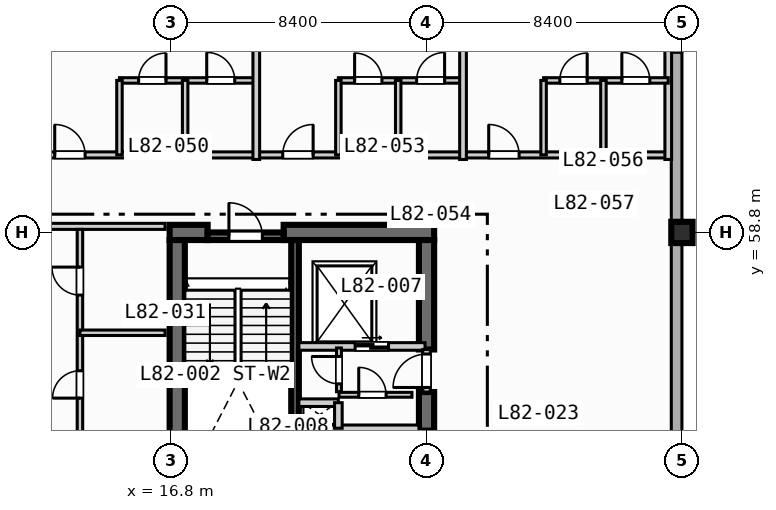
"""IFC4 building model, lengths in metres.
Left out: names, types, materials, properties, quantities, classifications, styles, units other than length and angle.
Written with IfcOpenShell. Run it as: python <this file> out.ifc"""

import sys

from ifc_helpers import new_model, si_unit, direction, frame, frame_2d, origin, origin_2d, place, context, subcontext, project, spatial, rectangle, extrude, element, fill, save


model = new_model("IFC4")
c1 = context("Model", 3, precision=1e-05, world=origin(), true_north=direction((0.0, 1.0)))
c2 = subcontext(c1, "Body", "Model", "MODEL_VIEW")
j1 = project(units=[si_unit("LENGTHUNIT", "METRE"), si_unit("PLANEANGLEUNIT", "RADIAN")], contexts=[c1])
p1 = place(None, origin())
s1 = spatial("IfcSite", under=j1, at=p1, CompositionType="ELEMENT")
p2 = place(p1, origin())
s2 = spatial("IfcBuilding", under=s1, at=p2, CompositionType="ELEMENT")
p3 = place(p2, frame((0.0, 0.0, 332.0)))
s3 = spatial("IfcBuildingStorey", under=s2, at=p3, CompositionType="ELEMENT", Elevation=332.0)
p4 = place(p3, frame((20.875, 50.5, 0.0), z_axis=(0.0, 0.0, 1.0), x_axis=(0.0, 1.0, 0.0)))
e1 = element("IfcWall", 1, at=p4, inside=s3, PredefinedType="SOLIDWALL", context=c2, shape_type="SweptSolid", body=[
    extrude(rectangle(XDim=8.05, YDim=0.25, at=frame_2d((4.025, 0.0))), origin(), (0.0, 0.0, 1.0), 3.67),
])
p5 = place(p3, frame((16.75, 58.8, 0.0), z_axis=(0.0, 0.0, 1.0), x_axis=(1.0, 0.0, 0.0)))
e2 = element("IfcWall", 2, at=p5, inside=s3, PredefinedType="SHEAR", context=c2, shape_type="SweptSolid", body=[
    extrude(rectangle(XDim=1.25, YDim=0.5, at=frame_2d((0.625, 0.0))), origin(), (0.0, 0.0, 1.0), 3.67),
])
p6 = place(p3, frame((20.5, 58.8, 0.0), z_axis=(0.0, 0.0, 1.0), x_axis=(1.0, 0.0, 0.0)))
e3 = element("IfcWall", 3, at=p6, inside=s3, PredefinedType="SHEAR", context=c2, shape_type="SweptSolid", body=[
    extrude(rectangle(XDim=4.95, YDim=0.5, at=frame_2d((2.475, 0.0))), origin(), (0.0, 0.0, 1.0), 3.67),
])
p7 = place(p3, frame((17.0, 42.2, 0.0), z_axis=(0.0, 0.0, 1.0), x_axis=(0.0, 1.0, 0.0)))
e4 = element("IfcWall", 4, at=p7, inside=s3, PredefinedType="SHEAR", context=c2, shape_type="SweptSolid", body=[
    extrude(rectangle(XDim=16.35, YDim=0.5, at=frame_2d((8.175, 0.0))), origin(), (0.0, 0.0, 1.0), 3.67),
])
p8 = place(p3, frame((25.2, 52.28, 0.0), z_axis=(0.0, 0.0, 1.0), x_axis=(0.0, 1.0, 0.0)))
e5 = element("IfcWall", 5, at=p8, inside=s3, PredefinedType="SHEAR", context=c2, shape_type="SweptSolid", body=[
    extrude(rectangle(XDim=1.27, YDim=0.5, at=frame_2d((0.635, 0.0))), origin(), (0.0, 0.0, 1.0), 3.67),
])
p9 = place(p3, frame((25.2, 54.95, 0.0), z_axis=(0.0, 0.0, 1.0), x_axis=(0.0, 1.0, 0.0)))
e6 = element("IfcWall", 6, at=p9, inside=s3, PredefinedType="SHEAR", context=c2, shape_type="SweptSolid", body=[
    extrude(rectangle(XDim=3.6, YDim=0.5, at=frame_2d((1.8, 0.0))), origin(), (0.0, 0.0, 1.0), 3.67),
])
p10 = place(p3, frame((33.6, 58.8, 0.0), z_axis=(0.0, 0.0, 1.0), x_axis=(1.0, 0.0, 0.0)))
e7 = element("IfcColumn", 7, at=p10, inside=s3, PredefinedType="COLUMN", context=c2, shape_type="SweptSolid", body=[
    extrude(rectangle(XDim=0.7, YDim=0.7, at=origin_2d()), origin(), (0.0, 0.0, 1.0), 3.9),
])
p11 = place(p3, frame((33.425, 72.425, 0.0), z_axis=(0.0, 0.0, 1.0), x_axis=(0.0, -1.0, 0.0)))
e8 = element("IfcWall", 8, at=p11, inside=s3, PredefinedType="STANDARD", context=c2, shape_type="SweptSolid", body=[
    extrude(rectangle(XDim=39.0, YDim=0.35, at=frame_2d((19.5, 0.0))), origin(), (0.0, 0.0, 1.0), 3.67),
])
p12 = place(p11, frame((5.9, 0.0, 0.85)))
e9 = element("IfcOpeningElement", 9, at=p12, cuts=e8, PredefinedType="OPENING", context=c2, shape_type="SweptSolid", body=[
    extrude(rectangle(XDim=1.8, YDim=1.8, at=frame_2d((0.9, 0.9))), frame((0.0, 0.185, 0.0), z_axis=(0.0, -1.0, 0.0), x_axis=(1.0, 0.0, 0.0)), (0.0, 0.0, 1.0), 0.37),
])
p13 = place(p3, frame((18.0, 58.675, 0.0), z_axis=(0.0, 0.0, 1.0), x_axis=(1.0, 0.0, 0.0)))
e10 = element("IfcWall", 10, at=p13, inside=s3, PredefinedType="SOLIDWALL", context=c2, shape_type="SweptSolid", body=[
    extrude(rectangle(XDim=2.5, YDim=0.25, at=frame_2d((1.25, 0.0))), origin(), (0.0, 0.0, 1.0), 3.67),
])
p14 = place(p13, frame((0.7, 0.0, 0.0)))
e11 = element("IfcOpeningElement", 11, at=p14, cuts=e10, PredefinedType="OPENING", context=c2, shape_type="SweptSolid", body=[
    extrude(rectangle(XDim=1.1, YDim=2.15, at=frame_2d((0.55, 1.075))), frame((0.0, 0.135, 0.0), z_axis=(0.0, -1.0, 0.0), x_axis=(1.0, 0.0, 0.0)), (0.0, 0.0, 1.0), 0.27),
])
p15 = place(p3, frame((21.0, 52.34, 0.0), z_axis=(0.0, 0.0, 1.0), x_axis=(1.0, 0.0, 0.0)))
e12 = element("IfcWall", 12, at=p15, inside=s3, PredefinedType="SOLIDWALL", context=c2, shape_type="SweptSolid", body=[
    extrude(rectangle(XDim=3.95, YDim=0.25, at=frame_2d((1.975, 0.0))), origin(), (0.0, 0.0, 1.0), 3.67),
])
p16 = place(p3, frame((21.0, 55.05, 0.0), z_axis=(0.0, 0.0, 1.0), x_axis=(1.0, 0.0, 0.0)))
e13 = element("IfcWall", 13, at=p16, inside=s3, PredefinedType="SOLIDWALL", context=c2, shape_type="SweptSolid", body=[
    extrude(rectangle(XDim=4.15, YDim=0.25, at=frame_2d((2.075, 0.0))), origin(), (0.0, 0.0, 1.0), 3.67),
])
p17 = place(p16, frame((1.85, 0.0, 0.0)))
e14 = element("IfcOpeningElement", 14, at=p17, cuts=e13, PredefinedType="OPENING", context=c2, shape_type="SweptSolid", body=[
    extrude(rectangle(XDim=1.1, YDim=2.15, at=frame_2d((0.55, 1.075))), frame((0.0, 0.135, 0.0), z_axis=(0.0, -1.0, 0.0), x_axis=(1.0, 0.0, 0.0)), (0.0, 0.0, 1.0), 0.27),
])
p18 = place(p3, frame((25.2, 53.55, 0.0), z_axis=(0.0, 0.0, 1.0), x_axis=(0.0, 1.0, 0.0)))
e15 = element("IfcWall", 15, at=p18, inside=s3, PredefinedType="SOLIDWALL", context=c2, shape_type="SweptSolid", body=[
    extrude(rectangle(XDim=1.4, YDim=0.25, at=frame_2d((0.7, 0.0))), origin(), (0.0, 0.0, 1.0), 3.67),
])
p19 = place(p18, frame((0.15, 0.0, 0.0)))
e16 = element("IfcOpeningElement", 16, at=p19, cuts=e15, PredefinedType="OPENING", context=c2, shape_type="SweptSolid", body=[
    extrude(rectangle(XDim=1.1, YDim=2.15, at=frame_2d((0.55, 1.075))), frame((0.0, 0.135, 0.0), z_axis=(0.0, -1.0, 0.0), x_axis=(1.0, 0.0, 0.0)), (0.0, 0.0, 1.0), 0.27),
])
p20 = place(p3, frame((21.0, 53.2, 0.0), z_axis=(0.0, 0.0, 1.0), x_axis=(1.0, 0.0, 0.0)))
e17 = element("IfcWall", 17, at=p20, inside=s3, PredefinedType="SOLIDWALL", context=c2, shape_type="SweptSolid", body=[
    extrude(rectangle(XDim=1.3, YDim=0.25, at=frame_2d((0.65, 0.0))), origin(), (0.0, 0.0, 1.0), 3.67),
])
p21 = place(p3, frame((22.3, 52.36, 0.0), z_axis=(0.0, 0.0, 1.0), x_axis=(0.0, 1.0, 0.0)))
e18 = element("IfcWall", 18, at=p21, inside=s3, PredefinedType="SOLIDWALL", context=c2, shape_type="SweptSolid", body=[
    extrude(rectangle(XDim=0.84, YDim=0.25, at=frame_2d((0.42, 0.0))), origin(), (0.0, 0.0, 1.0), 3.67),
])
p22 = place(p3, frame((22.32, 53.56, 0.0), z_axis=(0.0, 0.0, 1.0), x_axis=(0.0, 1.0, 0.0)))
e19 = element("IfcWall", 19, at=p22, inside=s3, PredefinedType="PARTITIONING", context=c2, shape_type="SweptSolid", body=[
    extrude(rectangle(XDim=1.44, YDim=0.16, at=frame_2d((0.72, 0.0))), origin(), (0.0, 0.0, 1.0), 3.67),
])
p23 = place(p22, frame((0.26, 0.0, 0.0)))
e20 = element("IfcOpeningElement", 20, at=p23, cuts=e19, PredefinedType="OPENING", context=c2, shape_type="SweptSolid", body=[
    extrude(rectangle(XDim=0.9, YDim=2.1, at=frame_2d((0.45, 1.05))), frame((0.0, 0.09, 0.0), z_axis=(0.0, -1.0, 0.0), x_axis=(1.0, 0.0, 0.0)), (0.0, 0.0, 1.0), 0.18),
])
p24 = place(p3, frame((22.32, 53.46, 0.0), z_axis=(0.0, 0.0, 1.0), x_axis=(1.0, 0.0, 0.0)))
e21 = element("IfcWall", 21, at=p24, inside=s3, PredefinedType="PARTITIONING", context=c2, shape_type="SweptSolid", body=[
    extrude(rectangle(XDim=2.4, YDim=0.16, at=frame_2d((1.2, 0.0))), origin(), (0.0, 0.0, 1.0), 3.67),
])
p25 = place(p24, frame((0.65, 0.0, 0.0)))
e22 = element("IfcOpeningElement", 22, at=p25, cuts=e21, PredefinedType="OPENING", context=c2, shape_type="SweptSolid", body=[
    extrude(rectangle(XDim=0.9, YDim=2.1, at=frame_2d((0.45, 1.05))), frame((0.0, 0.09, 0.0), z_axis=(0.0, -1.0, 0.0), x_axis=(1.0, 0.0, 0.0)), (0.0, 0.0, 1.0), 0.18),
])
p26 = place(p3, frame((8.65, 59.0, 0.0), z_axis=(0.0, 0.0, 1.0), x_axis=(1.0, 0.0, 0.0)))
e23 = element("IfcWall", 23, at=p26, inside=s3, PredefinedType="PARTITIONING", context=c2, shape_type="SweptSolid", body=[
    extrude(rectangle(XDim=7.95, YDim=0.2, at=frame_2d((3.975, 0.0))), origin(), (0.0, 0.0, 1.0), 3.07),
])
p27 = place(p26, frame((2.0, 0.0, 0.0)))
e24 = element("IfcOpeningElement", 24, at=p27, cuts=e23, PredefinedType="OPENING", context=c2, shape_type="SweptSolid", body=[
    extrude(rectangle(XDim=1.0, YDim=2.15, at=frame_2d((0.5, 1.075))), frame((0.0, 0.11, 0.0), z_axis=(0.0, -1.0, 0.0), x_axis=(1.0, 0.0, 0.0)), (0.0, 0.0, 1.0), 0.22),
])
p28 = place(p3, frame((13.8, 52.1, 0.0), z_axis=(0.0, 0.0, 1.0), x_axis=(0.0, 1.0, 0.0)))
e25 = element("IfcWall", 25, at=p28, inside=s3, PredefinedType="PLUMBINGWALL", context=c2, shape_type="SweptSolid", body=[
    extrude(rectangle(XDim=6.8, YDim=0.18, at=frame_2d((3.4, 0.0))), origin(), (0.0, 0.0, 1.0), 3.67),
])
p29 = place(p28, frame((1.25, 0.0, 0.0)))
e26 = element("IfcOpeningElement", 26, at=p29, cuts=e25, PredefinedType="OPENING", context=c2, shape_type="SweptSolid", body=[
    extrude(rectangle(XDim=0.9, YDim=2.1, at=frame_2d((0.45, 1.05))), frame((0.0, 0.1, 0.0), z_axis=(0.0, -1.0, 0.0), x_axis=(1.0, 0.0, 0.0)), (0.0, 0.0, 1.0), 0.2),
])
p30 = place(p28, frame((4.64, 0.0, 0.0)))
e27 = element("IfcOpeningElement", 27, at=p30, cuts=e25, PredefinedType="OPENING", context=c2, shape_type="SweptSolid", body=[
    extrude(rectangle(XDim=0.92, YDim=2.1, at=frame_2d((0.46, 1.05))), frame((0.0, 0.1, 0.0), z_axis=(0.0, -1.0, 0.0), x_axis=(1.0, 0.0, 0.0)), (0.0, 0.0, 1.0), 0.2),
])
p31 = place(p3, frame((13.8, 55.5, 0.0), z_axis=(0.0, 0.0, 1.0), x_axis=(1.0, 0.0, 0.0)))
e28 = element("IfcWall", 28, at=p31, inside=s3, PredefinedType="PLUMBINGWALL", context=c2, shape_type="SweptSolid", body=[
    extrude(rectangle(XDim=2.8, YDim=0.18, at=frame_2d((1.4, 0.0))), origin(), (0.0, 0.0, 1.0), 3.67),
])
p32 = place(p3, frame((11.8, 61.35, 0.0), z_axis=(0.0, 0.0, 1.0), x_axis=(1.0, 0.0, 0.0)))
e29 = element("IfcWall", 29, at=p32, inside=s3, PredefinedType="PARTITIONING", context=c2, shape_type="SweptSolid", body=[
    extrude(rectangle(XDim=21.35, YDim=0.2, at=frame_2d((10.675, 0.0))), origin(), (0.0, 0.0, 1.0), 3.67),
])
p33 = place(p32, frame((1.17, 0.0, 0.0)))
e30 = element("IfcOpeningElement", 30, at=p33, cuts=e29, PredefinedType="OPENING", context=c2, shape_type="SweptSolid", body=[
    extrude(rectangle(XDim=1.0, YDim=2.15, at=frame_2d((0.5, 1.075))), frame((0.0, 0.11, 0.0), z_axis=(0.0, -1.0, 0.0), x_axis=(1.0, 0.0, 0.0)), (0.0, 0.0, 1.0), 0.22),
])
p34 = place(p32, frame((8.67, 0.0, 0.0)))
e31 = element("IfcOpeningElement", 31, at=p34, cuts=e29, PredefinedType="OPENING", context=c2, shape_type="SweptSolid", body=[
    extrude(rectangle(XDim=1.0, YDim=2.15, at=frame_2d((0.5, 1.075))), frame((0.0, 0.11, 0.0), z_axis=(0.0, -1.0, 0.0), x_axis=(1.0, 0.0, 0.0)), (0.0, 0.0, 1.0), 0.22),
])
p35 = place(p32, frame((15.445, 0.0, 0.0)))
e32 = element("IfcOpeningElement", 32, at=p35, cuts=e29, PredefinedType="OPENING", context=c2, shape_type="SweptSolid", body=[
    extrude(rectangle(XDim=1.0, YDim=2.15, at=frame_2d((0.5, 1.075))), frame((0.0, 0.11, 0.0), z_axis=(0.0, -1.0, 0.0), x_axis=(1.0, 0.0, 0.0)), (0.0, 0.0, 1.0), 0.22),
])
p36 = place(p3, frame((15.1, 63.8, 0.0), z_axis=(0.0, 0.0, 1.0), x_axis=(1.0, 0.0, 0.0)))
e33 = element("IfcWall", 33, at=p36, inside=s3, PredefinedType="PLUMBINGWALL", context=c2, shape_type="SweptSolid", body=[
    extrude(rectangle(XDim=4.5, YDim=0.18, at=frame_2d((2.25, 0.0))), origin(), (0.0, 0.0, 1.0), 3.67),
])
p37 = place(p36, frame((0.63, 0.0, 0.0)))
e34 = element("IfcOpeningElement", 34, at=p37, cuts=e33, PredefinedType="OPENING", context=c2, shape_type="SweptSolid", body=[
    extrude(rectangle(XDim=0.9, YDim=2.1, at=frame_2d((0.45, 1.05))), frame((0.0, 0.1, 0.0), z_axis=(0.0, -1.0, 0.0), x_axis=(1.0, 0.0, 0.0)), (0.0, 0.0, 1.0), 0.2),
])
p38 = place(p36, frame((2.87, 0.0, 0.0)))
e35 = element("IfcOpeningElement", 35, at=p38, cuts=e33, PredefinedType="OPENING", context=c2, shape_type="SweptSolid", body=[
    extrude(rectangle(XDim=0.92, YDim=2.1, at=frame_2d((0.46, 1.05))), frame((0.0, 0.1, 0.0), z_axis=(0.0, -1.0, 0.0), x_axis=(1.0, 0.0, 0.0)), (0.0, 0.0, 1.0), 0.2),
])
for number, where, z_axis, x_axis in (
    (36, (15.1, 61.35, 0.0), (0.0, 0.0, 1.0), (0.0, 1.0, 0.0)),
    (37, (17.26, 61.35, 0.0), (0.0, 0.0, 1.0), (0.0, 1.0, 0.0)),
):
    element("IfcWall", number, at=place(p3, frame(where, z_axis=z_axis, x_axis=x_axis)), inside=s3, PredefinedType="PLUMBINGWALL", context=c2, shape_type="SweptSolid", body=[
        extrude(rectangle(XDim=2.45, YDim=0.18, at=frame_2d((1.225, 0.0))), origin(), (0.0, 0.0, 1.0), 3.67),
    ])
p39 = place(p3, frame((19.6, 61.2, 0.0), z_axis=(0.0, 0.0, 1.0), x_axis=(0.0, 1.0, 0.0)))
e38 = element("IfcWall", 38, at=p39, inside=s3, PredefinedType="PARTITIONING", context=c2, shape_type="SweptSolid", body=[
    extrude(rectangle(XDim=11.38, YDim=0.22, at=frame_2d((5.69, 0.0))), origin(), (0.0, 0.0, 1.0), 3.67),
])
p40 = place(p3, frame((22.3, 63.8, 0.0), z_axis=(0.0, 0.0, 1.0), x_axis=(1.0, 0.0, 0.0)))
e39 = element("IfcWall", 39, at=p40, inside=s3, PredefinedType="PLUMBINGWALL", context=c2, shape_type="SweptSolid", body=[
    extrude(rectangle(XDim=4.1, YDim=0.18, at=frame_2d((2.05, 0.0))), origin(), (0.0, 0.0, 1.0), 3.67),
])
p41 = place(p40, frame((0.534, 0.0, 0.0)))
e40 = element("IfcOpeningElement", 40, at=p41, cuts=e39, PredefinedType="OPENING", context=c2, shape_type="SweptSolid", body=[
    extrude(rectangle(XDim=0.9, YDim=2.1, at=frame_2d((0.45, 1.05))), frame((0.0, 0.1, 0.0), z_axis=(0.0, -1.0, 0.0), x_axis=(1.0, 0.0, 0.0)), (0.0, 0.0, 1.0), 0.2),
])
p42 = place(p40, frame((2.574, 0.0, 0.0)))
e41 = element("IfcOpeningElement", 41, at=p42, cuts=e39, PredefinedType="OPENING", context=c2, shape_type="SweptSolid", body=[
    extrude(rectangle(XDim=0.92, YDim=2.1, at=frame_2d((0.46, 1.05))), frame((0.0, 0.1, 0.0), z_axis=(0.0, -1.0, 0.0), x_axis=(1.0, 0.0, 0.0)), (0.0, 0.0, 1.0), 0.2),
])
for number, where, z_axis, x_axis in (
    (42, (22.3, 61.35, 0.0), (0.0, 0.0, 1.0), (0.0, 1.0, 0.0)),
    (43, (24.268, 61.35, 0.0), (0.0, 0.0, 1.0), (0.0, 1.0, 0.0)),
):
    element("IfcWall", number, at=place(p3, frame(where, z_axis=z_axis, x_axis=x_axis)), inside=s3, PredefinedType="PLUMBINGWALL", context=c2, shape_type="SweptSolid", body=[
        extrude(rectangle(XDim=2.45, YDim=0.18, at=frame_2d((1.225, 0.0))), origin(), (0.0, 0.0, 1.0), 3.67),
    ])
for number, where, z_axis, x_axis in (
    (44, (26.4, 61.2, 0.0), (0.0, 0.0, 1.0), (0.0, 1.0, 0.0)),
    (45, (33.15, 61.2, 0.0), (0.0, 0.0, 1.0), (0.0, 1.0, 0.0)),
):
    element("IfcWall", number, at=place(p3, frame(where, z_axis=z_axis, x_axis=x_axis)), inside=s3, PredefinedType="PARTITIONING", context=c2, shape_type="SweptSolid", body=[
        extrude(rectangle(XDim=11.38, YDim=0.22, at=frame_2d((5.69, 0.0))), origin(), (0.0, 0.0, 1.0), 3.67),
    ])
p43 = place(p3, frame((29.05, 63.8, 0.0), z_axis=(0.0, 0.0, 1.0), x_axis=(1.0, 0.0, 0.0)))
e46 = element("IfcWall", 46, at=p43, inside=s3, PredefinedType="PLUMBINGWALL", context=c2, shape_type="SweptSolid", body=[
    extrude(rectangle(XDim=4.1, YDim=0.18, at=frame_2d((2.05, 0.0))), origin(), (0.0, 0.0, 1.0), 3.67),
])
p44 = place(p43, frame((0.534, 0.0, 0.0)))
e47 = element("IfcOpeningElement", 47, at=p44, cuts=e46, PredefinedType="OPENING", context=c2, shape_type="SweptSolid", body=[
    extrude(rectangle(XDim=0.9, YDim=2.1, at=frame_2d((0.45, 1.05))), frame((0.0, 0.1, 0.0), z_axis=(0.0, -1.0, 0.0), x_axis=(1.0, 0.0, 0.0)), (0.0, 0.0, 1.0), 0.2),
])
p45 = place(p43, frame((2.574, 0.0, 0.0)))
e48 = element("IfcOpeningElement", 48, at=p45, cuts=e46, PredefinedType="OPENING", context=c2, shape_type="SweptSolid", body=[
    extrude(rectangle(XDim=0.92, YDim=2.1, at=frame_2d((0.46, 1.05))), frame((0.0, 0.1, 0.0), z_axis=(0.0, -1.0, 0.0), x_axis=(1.0, 0.0, 0.0)), (0.0, 0.0, 1.0), 0.2),
])
for number, where, z_axis, x_axis in (
    (49, (29.05, 61.35, 0.0), (0.0, 0.0, 1.0), (0.0, 1.0, 0.0)),
    (50, (31.018, 61.35, 0.0), (0.0, 0.0, 1.0), (0.0, 1.0, 0.0)),
):
    element("IfcWall", number, at=place(p3, frame(where, z_axis=z_axis, x_axis=x_axis)), inside=s3, PredefinedType="PLUMBINGWALL", context=c2, shape_type="SweptSolid", body=[
        extrude(rectangle(XDim=2.45, YDim=0.18, at=frame_2d((1.225, 0.0))), origin(), (0.0, 0.0, 1.0), 3.67),
    ])
p46 = place(p14, origin())
e51 = element("IfcDoor", 51, at=p46, inside=s3, OperationType="SINGLE_SWING_LEFT", PredefinedType="DOOR", context=c2, shape_type="SweptSolid", body=[
    extrude(rectangle(XDim=1.1, YDim=2.15, at=frame_2d((0.55, 1.075))), frame((0.0, 0.025, 0.0), z_axis=(0.0, -1.0, 0.0), x_axis=(1.0, 0.0, 0.0)), (0.0, 0.0, 1.0), 0.05),
])
fill(e11, e51)
p47 = place(p17, origin())
e52 = element("IfcDoor", 52, at=p47, inside=s3, OperationType="SLIDING_TO_LEFT", PredefinedType="DOOR", context=c2, shape_type="SweptSolid", body=[
    extrude(rectangle(XDim=1.1, YDim=2.15, at=frame_2d((0.55, 1.075))), frame((0.0, 0.025, 0.0), z_axis=(0.0, -1.0, 0.0), x_axis=(1.0, 0.0, 0.0)), (0.0, 0.0, 1.0), 0.05),
])
fill(e14, e52)
p48 = place(p19, origin())
e53 = element("IfcDoor", 53, at=p48, inside=s3, OperationType="SINGLE_SWING_LEFT", PredefinedType="DOOR", context=c2, shape_type="SweptSolid", body=[
    extrude(rectangle(XDim=1.1, YDim=2.15, at=frame_2d((0.55, 1.075))), frame((0.0, 0.025, 0.0), z_axis=(0.0, -1.0, 0.0), x_axis=(1.0, 0.0, 0.0)), (0.0, 0.0, 1.0), 0.05),
])
fill(e16, e53)
p49 = place(p23, origin())
e54 = element("IfcDoor", 54, at=p49, inside=s3, OperationType="SINGLE_SWING_RIGHT", PredefinedType="DOOR", context=c2, shape_type="SweptSolid", body=[
    extrude(rectangle(XDim=0.9, YDim=2.1, at=frame_2d((0.45, 1.05))), frame((0.0, 0.025, 0.0), z_axis=(0.0, -1.0, 0.0), x_axis=(1.0, 0.0, 0.0)), (0.0, 0.0, 1.0), 0.05),
])
fill(e20, e54)
p50 = place(p25, origin())
e55 = element("IfcDoor", 55, at=p50, inside=s3, OperationType="SINGLE_SWING_LEFT", PredefinedType="DOOR", context=c2, shape_type="SweptSolid", body=[
    extrude(rectangle(XDim=0.9, YDim=2.1, at=frame_2d((0.45, 1.05))), frame((0.0, 0.025, 0.0), z_axis=(0.0, -1.0, 0.0), x_axis=(1.0, 0.0, 0.0)), (0.0, 0.0, 1.0), 0.05),
])
fill(e22, e55)
p51 = place(p29, origin())
e56 = element("IfcDoor", 56, at=p51, inside=s3, OperationType="SINGLE_SWING_LEFT", PredefinedType="DOOR", context=c2, shape_type="SweptSolid", body=[
    extrude(rectangle(XDim=0.9, YDim=2.1, at=frame_2d((0.45, 1.05))), frame((0.0, 0.025, 0.0), z_axis=(0.0, -1.0, 0.0), x_axis=(1.0, 0.0, 0.0)), (0.0, 0.0, 1.0), 0.05),
])
fill(e26, e56)
p52 = place(p30, origin())
e57 = element("IfcDoor", 57, at=p52, inside=s3, OperationType="SINGLE_SWING_RIGHT", PredefinedType="DOOR", context=c2, shape_type="SweptSolid", body=[
    extrude(rectangle(XDim=0.92, YDim=2.1, at=frame_2d((0.46, 1.05))), frame((0.0, 0.025, 0.0), z_axis=(0.0, -1.0, 0.0), x_axis=(1.0, 0.0, 0.0)), (0.0, 0.0, 1.0), 0.05),
])
fill(e27, e57)
p53 = place(p33, origin())
e58 = element("IfcDoor", 58, at=p53, inside=s3, OperationType="SINGLE_SWING_LEFT", PredefinedType="DOOR", context=c2, shape_type="SweptSolid", body=[
    extrude(rectangle(XDim=1.0, YDim=2.15, at=frame_2d((0.5, 1.075))), frame((0.0, 0.025, 0.0), z_axis=(0.0, -1.0, 0.0), x_axis=(1.0, 0.0, 0.0)), (0.0, 0.0, 1.0), 0.05),
])
fill(e30, e58)
p54 = place(p34, origin())
e59 = element("IfcDoor", 59, at=p54, inside=s3, OperationType="SINGLE_SWING_RIGHT", PredefinedType="DOOR", context=c2, shape_type="SweptSolid", body=[
    extrude(rectangle(XDim=1.0, YDim=2.15, at=frame_2d((0.5, 1.075))), frame((0.0, 0.025, 0.0), z_axis=(0.0, -1.0, 0.0), x_axis=(1.0, 0.0, 0.0)), (0.0, 0.0, 1.0), 0.05),
])
fill(e31, e59)
p55 = place(p35, origin())
e60 = element("IfcDoor", 60, at=p55, inside=s3, OperationType="SINGLE_SWING_LEFT", PredefinedType="DOOR", context=c2, shape_type="SweptSolid", body=[
    extrude(rectangle(XDim=1.0, YDim=2.15, at=frame_2d((0.5, 1.075))), frame((0.0, 0.025, 0.0), z_axis=(0.0, -1.0, 0.0), x_axis=(1.0, 0.0, 0.0)), (0.0, 0.0, 1.0), 0.05),
])
fill(e32, e60)
p56 = place(p37, origin())
e61 = element("IfcDoor", 61, at=p56, inside=s3, OperationType="SINGLE_SWING_RIGHT", PredefinedType="DOOR", context=c2, shape_type="SweptSolid", body=[
    extrude(rectangle(XDim=0.9, YDim=2.1, at=frame_2d((0.45, 1.05))), frame((0.0, 0.025, 0.0), z_axis=(0.0, -1.0, 0.0), x_axis=(1.0, 0.0, 0.0)), (0.0, 0.0, 1.0), 0.05),
])
fill(e34, e61)
p57 = place(p38, origin())
e62 = element("IfcDoor", 62, at=p57, inside=s3, OperationType="SINGLE_SWING_LEFT", PredefinedType="DOOR", context=c2, shape_type="SweptSolid", body=[
    extrude(rectangle(XDim=0.92, YDim=2.1, at=frame_2d((0.46, 1.05))), frame((0.0, 0.025, 0.0), z_axis=(0.0, -1.0, 0.0), x_axis=(1.0, 0.0, 0.0)), (0.0, 0.0, 1.0), 0.05),
])
fill(e35, e62)
p58 = place(p41, origin())
e63 = element("IfcDoor", 63, at=p58, inside=s3, OperationType="SINGLE_SWING_LEFT", PredefinedType="DOOR", context=c2, shape_type="SweptSolid", body=[
    extrude(rectangle(XDim=0.9, YDim=2.1, at=frame_2d((0.45, 1.05))), frame((0.0, 0.025, 0.0), z_axis=(0.0, -1.0, 0.0), x_axis=(1.0, 0.0, 0.0)), (0.0, 0.0, 1.0), 0.05),
])
fill(e40, e63)
p59 = place(p42, origin())
e64 = element("IfcDoor", 64, at=p59, inside=s3, OperationType="SINGLE_SWING_RIGHT", PredefinedType="DOOR", context=c2, shape_type="SweptSolid", body=[
    extrude(rectangle(XDim=0.92, YDim=2.1, at=frame_2d((0.46, 1.05))), frame((0.0, 0.025, 0.0), z_axis=(0.0, -1.0, 0.0), x_axis=(1.0, 0.0, 0.0)), (0.0, 0.0, 1.0), 0.05),
])
fill(e41, e64)
p60 = place(p44, origin())
e65 = element("IfcDoor", 65, at=p60, inside=s3, OperationType="SINGLE_SWING_RIGHT", PredefinedType="DOOR", context=c2, shape_type="SweptSolid", body=[
    extrude(rectangle(XDim=0.9, YDim=2.1, at=frame_2d((0.45, 1.05))), frame((0.0, 0.025, 0.0), z_axis=(0.0, -1.0, 0.0), x_axis=(1.0, 0.0, 0.0)), (0.0, 0.0, 1.0), 0.05),
])
fill(e47, e65)
p61 = place(p45, origin())
e66 = element("IfcDoor", 66, at=p61, inside=s3, OperationType="SINGLE_SWING_LEFT", PredefinedType="DOOR", context=c2, shape_type="SweptSolid", body=[
    extrude(rectangle(XDim=0.92, YDim=2.1, at=frame_2d((0.46, 1.05))), frame((0.0, 0.025, 0.0), z_axis=(0.0, -1.0, 0.0), x_axis=(1.0, 0.0, 0.0)), (0.0, 0.0, 1.0), 0.05),
])
fill(e48, e66)
save(model, sys.argv[1])
